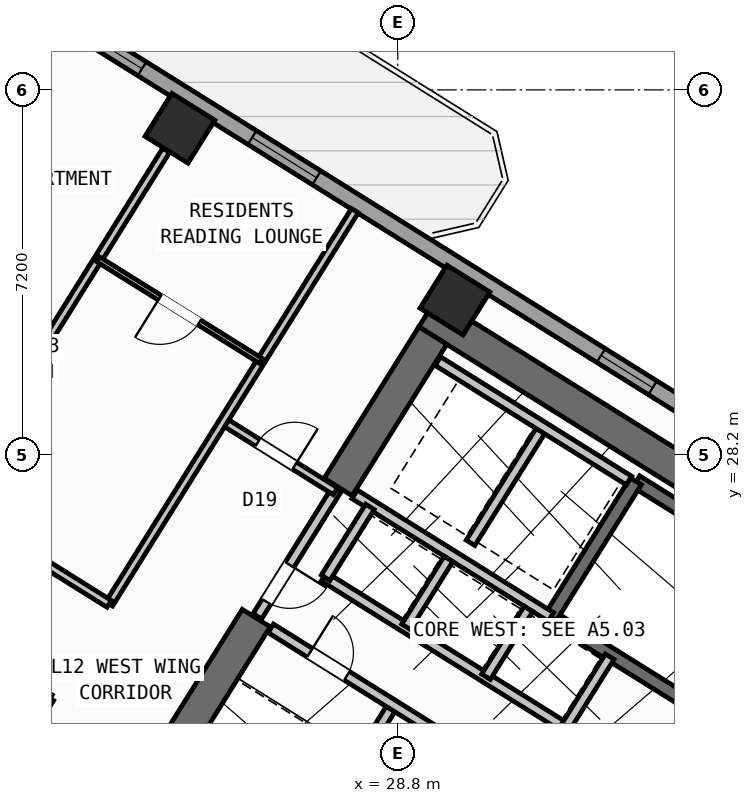
"""IFC4 building model, lengths in metres.
Left out: names, types, materials, properties, quantities, classifications, styles, units other than length and angle.
Written with IfcOpenShell. Run it as: python <this file> out.ifc"""

import sys

from ifc_helpers import new_model, si_unit, direction, frame, frame_2d, origin, origin_2d, place, context, subcontext, project, spatial, rectangle, hollow_rectangle, extrude, source, transform, mapped, element, fill, save


model = new_model("IFC4")
c1 = context("Model", 3, precision=1e-05, world=origin(), true_north=direction((0.0, 1.0)))
c2 = subcontext(c1, "Body", "Model", "MODEL_VIEW")
j1 = project(units=[si_unit("LENGTHUNIT", "METRE"), si_unit("PLANEANGLEUNIT", "RADIAN")], contexts=[c1])
p1 = place(None, origin())
s1 = spatial("IfcSite", under=j1, at=p1, CompositionType="ELEMENT")
p2 = place(p1, origin())
s2 = spatial("IfcBuilding", under=s1, at=p2, CompositionType="ELEMENT")
p3 = place(p2, frame((0.0, 0.0, 49.2)))
s3 = spatial("IfcBuildingStorey", under=s2, at=p3, CompositionType="ELEMENT", Elevation=49.2)
p4 = place(p3, frame((40.615, 23.983, 0.0), z_axis=(0.0, 0.0, 1.0), x_axis=(-0.848045953968, 0.529922692436, 0.0)))
e1 = element("IfcWall", 1, at=p4, inside=s3, PredefinedType="SHEAR", context=c2, shape_type="SweptSolid", body=[
    extrude(rectangle(XDim=13.24, YDim=0.65, at=frame_2d((6.62, 0.0))), origin(), (0.0, 0.0, 1.0), 3.35),
])
p5 = place(p3, frame((29.491, 30.552, 0.0), z_axis=(0.0, 0.0, 1.0), x_axis=(-0.529893103397, -0.8480644427, 0.0)))
e2 = element("IfcWall", 2, at=p5, inside=s3, PredefinedType="SHEAR", context=c2, shape_type="SweptSolid", body=[
    extrude(rectangle(XDim=3.525, YDim=0.65, at=frame_2d((1.763, 0.0))), origin(), (0.0, 0.0, 1.0), 3.35),
])
p6 = place(p3, frame((26.007, 24.976, 0.0), z_axis=(0.0, 0.0, 1.0), x_axis=(-0.529916319127, -0.848049936456, 0.0)))
e3 = element("IfcWall", 3, at=p6, inside=s3, PredefinedType="SHEAR", context=c2, shape_type="SweptSolid", body=[
    extrude(rectangle(XDim=6.375, YDim=0.65, at=frame_2d((3.188, 0.0))), origin(), (0.0, 0.0, 1.0), 3.35),
])
m1 = source(origin(), c2, "Body", "SweptSolid", [
    extrude(hollow_rectangle(XDim=1.0, YDim=1.0, WallThickness=0.04, at=origin_2d()), origin(), (0.0, 0.0, 1.0), 3.6),
])
for number, where, z_axis, x_axis in (
    (4, (29.928, 31.251, 0.0), (0.0, 0.0, 1.0), (-0.848, 0.53, 0.0)),
    (5, (24.5, 34.643, 0.0), (0.0, 0.0, 1.0), (-0.848, 0.53, 0.0)),
):
    element("IfcColumn", number, at=place(p3, frame(where, z_axis=z_axis, x_axis=x_axis)), inside=s3, PredefinedType="COLUMN", context=c2, shape_type="MappedRepresentation", body=[
        mapped(m1, transform((0.0, 0.0, 0.0), scale=1.0)),
    ])
p7 = place(p3, frame((29.268, 6.429, 0.0), z_axis=(0.0, 0.0, 1.0), x_axis=(-0.848049971435, 0.529916263149, 0.0)))
e6 = element("IfcWall", 6, at=p7, inside=s3, PredefinedType="STANDARD", context=c2, shape_type="SweptSolid", body=[
    extrude(rectangle(XDim=31.588, YDim=0.32, at=frame_2d((15.794, 0.0))), origin(), (0.0, 0.0, 1.0), 3.35),
])
p8 = place(p7, frame((16.362, 0.0, 0.0)))
e7 = element("IfcOpeningElement", 7, at=p8, cuts=e6, PredefinedType="OPENING", context=c2, shape_type="SweptSolid", body=[
    extrude(rectangle(XDim=1.2, YDim=2.15, at=frame_2d((0.6, 1.075))), frame((0.0, 0.17, 0.0), z_axis=(0.0, -1.0, 0.0), x_axis=(1.0, 0.0, 0.0)), (0.0, 0.0, 1.0), 0.34),
])
p9 = place(p7, frame((2.989, 0.0, 0.8)))
e8 = element("IfcOpeningElement", 8, at=p9, cuts=e6, PredefinedType="OPENING", context=c2, shape_type="SweptSolid", body=[
    extrude(rectangle(XDim=2.1, YDim=1.55, at=frame_2d((1.05, 0.775))), frame((0.0, 0.17, 0.0), z_axis=(0.0, -1.0, 0.0), x_axis=(1.0, 0.0, 0.0)), (0.0, 0.0, 1.0), 0.34),
])
p10 = place(p7, frame((8.359, 0.0, 0.8)))
e9 = element("IfcOpeningElement", 9, at=p10, cuts=e6, PredefinedType="OPENING", context=c2, shape_type="SweptSolid", body=[
    extrude(rectangle(XDim=2.1, YDim=1.55, at=frame_2d((1.05, 0.775))), frame((0.0, 0.17, 0.0), z_axis=(0.0, -1.0, 0.0), x_axis=(1.0, 0.0, 0.0)), (0.0, 0.0, 1.0), 0.34),
])
p11 = place(p7, frame((13.284, 0.0, 0.95)))
e10 = element("IfcOpeningElement", 10, at=p11, cuts=e6, PredefinedType="OPENING", context=c2, shape_type="SweptSolid", body=[
    extrude(rectangle(XDim=1.2, YDim=1.4, at=frame_2d((0.6, 0.7))), frame((0.0, 0.17, 0.0), z_axis=(0.0, -1.0, 0.0), x_axis=(1.0, 0.0, 0.0)), (0.0, 0.0, 1.0), 0.34),
])
p12 = place(p7, frame((20.259, 0.0, 0.95)))
e11 = element("IfcOpeningElement", 11, at=p12, cuts=e6, PredefinedType="OPENING", context=c2, shape_type="SweptSolid", body=[
    extrude(rectangle(XDim=1.2, YDim=1.4, at=frame_2d((0.6, 0.7))), frame((0.0, 0.17, 0.0), z_axis=(0.0, -1.0, 0.0), x_axis=(1.0, 0.0, 0.0)), (0.0, 0.0, 1.0), 0.34),
])
p13 = place(p7, frame((22.929, 0.0, 0.95)))
e12 = element("IfcOpeningElement", 12, at=p13, cuts=e6, PredefinedType="OPENING", context=c2, shape_type="SweptSolid", body=[
    extrude(rectangle(XDim=1.2, YDim=1.4, at=frame_2d((0.6, 0.7))), frame((0.0, 0.17, 0.0), z_axis=(0.0, -1.0, 0.0), x_axis=(1.0, 0.0, 0.0)), (0.0, 0.0, 1.0), 0.34),
])
p14 = place(p7, frame((26.106, 0.0, 0.85)))
e13 = element("IfcOpeningElement", 13, at=p14, cuts=e6, PredefinedType="OPENING", context=c2, shape_type="SweptSolid", body=[
    extrude(rectangle(XDim=1.5, YDim=1.5, at=frame_2d((0.75, 0.75))), frame((0.0, 0.17, 0.0), z_axis=(0.0, -1.0, 0.0), x_axis=(1.0, 0.0, 0.0)), (0.0, 0.0, 1.0), 0.34),
])
p15 = place(p7, frame((29.068, 0.0, 0.85)))
e14 = element("IfcOpeningElement", 14, at=p15, cuts=e6, PredefinedType="OPENING", context=c2, shape_type="SweptSolid", body=[
    extrude(rectangle(XDim=1.8, YDim=1.5, at=frame_2d((0.9, 0.75))), frame((0.0, 0.17, 0.0), z_axis=(0.0, -1.0, 0.0), x_axis=(1.0, 0.0, 0.0)), (0.0, 0.0, 1.0), 0.34),
])
p16 = place(p3, frame((14.138, 41.825, 0.0), z_axis=(0.0, 0.0, 1.0), x_axis=(0.848046498049, -0.529921821731, 0.0)))
e15 = element("IfcWall", 15, at=p16, inside=s3, PredefinedType="STANDARD", context=c2, shape_type="SweptSolid", body=[
    extrude(rectangle(XDim=31.588, YDim=0.32, at=frame_2d((15.794, 0.0))), origin(), (0.0, 0.0, 1.0), 3.35),
])
p17 = place(p16, frame((3.159, 0.0, 0.0)))
e16 = element("IfcOpeningElement", 16, at=p17, cuts=e15, PredefinedType="OPENING", context=c2, shape_type="SweptSolid", body=[
    extrude(rectangle(XDim=1.05, YDim=2.15, at=frame_2d((0.525, 1.075))), frame((0.0, 0.17, 0.0), z_axis=(0.0, -1.0, 0.0), x_axis=(1.0, 0.0, 0.0)), (0.0, 0.0, 1.0), 0.34),
])
p18 = place(p16, frame((0.906, 0.0, 1.0)))
e17 = element("IfcOpeningElement", 17, at=p18, cuts=e15, PredefinedType="OPENING", context=c2, shape_type="SweptSolid", body=[
    extrude(rectangle(XDim=0.9, YDim=1.25, at=frame_2d((0.45, 0.625))), frame((0.0, 0.17, 0.0), z_axis=(0.0, -1.0, 0.0), x_axis=(1.0, 0.0, 0.0)), (0.0, 0.0, 1.0), 0.34),
])
p19 = place(p16, frame((9.537, 0.0, 0.85)))
e18 = element("IfcOpeningElement", 18, at=p19, cuts=e15, PredefinedType="OPENING", context=c2, shape_type="SweptSolid", body=[
    extrude(rectangle(XDim=1.8, YDim=1.5, at=frame_2d((0.9, 0.75))), frame((0.0, 0.17, 0.0), z_axis=(0.0, -1.0, 0.0), x_axis=(1.0, 0.0, 0.0)), (0.0, 0.0, 1.0), 0.34),
])
p20 = place(p16, frame((13.899, 0.0, 0.85)))
e19 = element("IfcOpeningElement", 19, at=p20, cuts=e15, PredefinedType="OPENING", context=c2, shape_type="SweptSolid", body=[
    extrude(rectangle(XDim=1.5, YDim=1.5, at=frame_2d((0.75, 0.75))), frame((0.0, 0.17, 0.0), z_axis=(0.0, -1.0, 0.0), x_axis=(1.0, 0.0, 0.0)), (0.0, 0.0, 1.0), 0.34),
])
p21 = place(p16, frame((22.019, 0.0, 0.95)))
e20 = element("IfcOpeningElement", 20, at=p21, cuts=e15, PredefinedType="OPENING", context=c2, shape_type="SweptSolid", body=[
    extrude(rectangle(XDim=1.2, YDim=1.4, at=frame_2d((0.6, 0.7))), frame((0.0, 0.17, 0.0), z_axis=(0.0, -1.0, 0.0), x_axis=(1.0, 0.0, 0.0)), (0.0, 0.0, 1.0), 0.34),
])
p22 = place(p16, frame((27.569, 0.0, 0.95)))
e21 = element("IfcOpeningElement", 21, at=p22, cuts=e15, PredefinedType="OPENING", context=c2, shape_type="SweptSolid", body=[
    extrude(rectangle(XDim=1.2, YDim=1.4, at=frame_2d((0.6, 0.7))), frame((0.0, 0.17, 0.0), z_axis=(0.0, -1.0, 0.0), x_axis=(1.0, 0.0, 0.0)), (0.0, 0.0, 1.0), 0.34),
])
p23 = place(p3, frame((39.721, 23.788, 0.0), z_axis=(0.0, 0.0, 1.0), x_axis=(-0.848054434086, 0.529909121291, 0.0)))
e22 = element("IfcWall", 22, at=p23, inside=s3, PredefinedType="SHEAR", context=c2, shape_type="SweptSolid", body=[
    extrude(rectangle(XDim=7.33, YDim=0.26, at=frame_2d((3.665, 0.0))), origin(), (0.0, 0.0, 1.0), 3.35),
])
p24 = place(p3, frame((38.046, 21.108, 0.0), z_axis=(0.0, 0.0, 1.0), x_axis=(-0.848054434086, 0.529909121291, 0.0)))
e23 = element("IfcWall", 23, at=p24, inside=s3, PredefinedType="SHEAR", context=c2, shape_type="SweptSolid", body=[
    extrude(rectangle(XDim=7.33, YDim=0.26, at=frame_2d((3.665, 0.0))), origin(), (0.0, 0.0, 1.0), 3.35),
])
p25 = place(p24, frame((0.22, 0.0, 0.0)))
e24 = element("IfcOpeningElement", 24, at=p25, cuts=e23, PredefinedType="OPENING", context=c2, shape_type="SweptSolid", body=[
    extrude(rectangle(XDim=1.1, YDim=2.1, at=frame_2d((0.55, 1.05))), frame((0.0, 0.14, 0.0), z_axis=(0.0, -1.0, 0.0), x_axis=(1.0, 0.0, 0.0)), (0.0, 0.0, 1.0), 0.28),
])
p26 = place(p3, frame((33.496, 27.677, 0.0), z_axis=(0.0, 0.0, 1.0), x_axis=(-0.529908658664, -0.84805472316, 0.0)))
e25 = element("IfcWall", 25, at=p26, inside=s3, PredefinedType="SHEAR", context=c2, shape_type="SweptSolid", body=[
    extrude(rectangle(XDim=3.16, YDim=0.26, at=frame_2d((1.58, 0.0))), origin(), (0.0, 0.0, 1.0), 3.35),
])
p27 = place(p3, frame((31.822, 24.998, 0.0), z_axis=(0.0, 0.0, 1.0), x_axis=(-0.848058348634, 0.529902856485, 0.0)))
e26 = element("IfcWall", 26, at=p27, inside=s3, PredefinedType="STANDARD", context=c2, shape_type="SweptSolid", body=[
    extrude(rectangle(XDim=4.568, YDim=0.2, at=frame_2d((2.284, 0.0))), origin(), (0.0, 0.0, 1.0), 3.34),
])
p28 = place(p3, frame((32.108, 22.814, 0.0), z_axis=(0.0, 0.0, 1.0), x_axis=(-0.848042229521, 0.529928652696, 0.0)))
e27 = element("IfcWall", 27, at=p28, inside=s3, PredefinedType="STANDARD", context=c2, shape_type="SweptSolid", body=[
    extrude(rectangle(XDim=5.62, YDim=0.2, at=frame_2d((2.81, 0.0))), origin(), (0.0, 0.0, 1.0), 3.34),
])
p29 = place(p3, frame((32.982, 24.213, 0.0), z_axis=(0.0, 0.0, 1.0), x_axis=(-0.529839334948, -0.84809803628, 0.0)))
e28 = element("IfcWall", 28, at=p29, inside=s3, PredefinedType="STANDARD", context=c2, shape_type="SweptSolid", body=[
    extrude(rectangle(XDim=1.65, YDim=0.2, at=frame_2d((0.825, 0.0))), origin(), (0.0, 0.0, 1.0), 3.34),
])
p30 = place(p3, frame((28.25, 27.17, 0.0), z_axis=(0.0, 0.0, 1.0), x_axis=(-0.529905827651, -0.848056492117, 0.0)))
e29 = element("IfcWall", 29, at=p30, inside=s3, PredefinedType="STANDARD", context=c2, shape_type="SweptSolid", body=[
    extrude(rectangle(XDim=1.65, YDim=0.2, at=frame_2d((0.825, 0.0))), origin(), (0.0, 0.0, 1.0), 3.34),
])
p31 = place(p3, frame((31.645, 28.716, 0.0), z_axis=(0.0, 0.0, 1.0), x_axis=(-0.52986693015, -0.848080795876, 0.0)))
e30 = element("IfcWall", 30, at=p31, inside=s3, PredefinedType="STANDARD", context=c2, shape_type="SweptSolid", body=[
    extrude(rectangle(XDim=2.66, YDim=0.2, at=frame_2d((1.33, 0.0))), origin(), (0.0, 0.0, 1.0), 3.34),
])
p32 = place(p3, frame((33.363, 27.69, 0.0), z_axis=(0.0, 0.0, 1.0), x_axis=(-0.848053806312, 0.529910125964, 0.0)))
e31 = element("IfcWall", 31, at=p32, inside=s3, PredefinedType="STANDARD", context=c2, shape_type="SweptSolid", body=[
    extrude(rectangle(XDim=4.448, YDim=0.2, at=frame_2d((2.224, 0.0))), origin(), (0.0, 0.0, 1.0), 3.34),
])
for number, where, z_axis, x_axis in (
    (32, (31.379, 25.156, 0.0), (0.0, 0.0, 1.0), (-0.53, -0.848, 0.0)),
    (33, (29.801, 26.142, 0.0), (0.0, 0.0, 1.0), (-0.53, -0.848, 0.0)),
):
    element("IfcWall", number, at=place(p3, frame(where, z_axis=z_axis, x_axis=x_axis)), inside=s3, PredefinedType="STANDARD", context=c2, shape_type="SweptSolid", body=[
        extrude(rectangle(XDim=1.58, YDim=0.2, at=frame_2d((0.79, 0.0))), origin(), (0.0, 0.0, 1.0), 3.34),
    ])
p33 = place(p3, frame((28.71, 23.263, 0.0), z_axis=(0.0, 0.0, 1.0), x_axis=(-0.529907497854, -0.848055448493, 0.0)))
e34 = element("IfcWall", 34, at=p33, inside=s3, PredefinedType="STANDARD", context=c2, shape_type="SweptSolid", body=[
    extrude(rectangle(XDim=2.88, YDim=0.2, at=frame_2d((1.44, 0.0))), origin(), (0.0, 0.0, 1.0), 3.34),
])
p34 = place(p3, frame((31.525, 21.504, 0.0), z_axis=(0.0, 0.0, 1.0), x_axis=(-0.848044998614, 0.529924221305, 0.0)))
e35 = element("IfcWall", 35, at=p34, inside=s3, PredefinedType="STANDARD", context=c2, shape_type="SweptSolid", body=[
    extrude(rectangle(XDim=6.168, YDim=0.2, at=frame_2d((3.084, 0.0))), origin(), (0.0, 0.0, 1.0), 3.34),
])
p35 = place(p34, frame((4.4, 0.0, 0.0)))
e36 = element("IfcOpeningElement", 36, at=p35, cuts=e35, PredefinedType="OPENING", context=c2, shape_type="SweptSolid", body=[
    extrude(rectangle(XDim=0.86, YDim=2.05, at=frame_2d((0.43, 1.025))), frame((0.0, 0.11, 0.0), z_axis=(0.0, -1.0, 0.0), x_axis=(1.0, 0.0, 0.0)), (0.0, 0.0, 1.0), 0.22),
])
p36 = place(p34, frame((0.35, 0.0, 0.0)))
e37 = element("IfcOpeningElement", 37, at=p36, cuts=e35, PredefinedType="OPENING", context=c2, shape_type="SweptSolid", body=[
    extrude(rectangle(XDim=0.86, YDim=2.05, at=frame_2d((0.43, 1.025))), frame((0.0, 0.11, 0.0), z_axis=(0.0, -1.0, 0.0), x_axis=(1.0, 0.0, 0.0)), (0.0, 0.0, 1.0), 0.22),
])
p37 = place(p3, frame((27.596, 27.52, 0.0), z_axis=(0.0, 0.0, 1.0), x_axis=(-0.529865479138, -0.848081702443, 0.0)))
e38 = element("IfcWall", 38, at=p37, inside=s3, PredefinedType="STANDARD", context=c2, shape_type="SweptSolid", body=[
    extrude(rectangle(XDim=2.96, YDim=0.2, at=frame_2d((1.48, 0.0))), origin(), (0.0, 0.0, 1.0), 3.34),
])
p38 = place(p37, frame((1.76, 0.0, 0.0)))
e39 = element("IfcOpeningElement", 39, at=p38, cuts=e38, PredefinedType="OPENING", context=c2, shape_type="SweptSolid", body=[
    extrude(rectangle(XDim=0.86, YDim=2.05, at=frame_2d((0.43, 1.025))), frame((0.0, 0.11, 0.0), z_axis=(0.0, -1.0, 0.0), x_axis=(1.0, 0.0, 0.0)), (0.0, 0.0, 1.0), 0.22),
])
p39 = place(p3, frame((27.57, 27.478, 0.0), z_axis=(0.0, 0.0, 1.0), x_axis=(-0.848050851465, 0.529914854792, 0.0)))
e40 = element("IfcWall", 40, at=p39, inside=s3, PredefinedType="PARTITIONING", context=c2, shape_type="SweptSolid", body=[
    extrude(rectangle(XDim=2.61, YDim=0.16, at=frame_2d((1.305, 0.0))), origin(), (0.0, 0.0, 1.0), 3.34),
])
p40 = place(p39, frame((0.95, 0.0, 0.0)))
e41 = element("IfcOpeningElement", 41, at=p40, cuts=e40, PredefinedType="OPENING", context=c2, shape_type="SweptSolid", body=[
    extrude(rectangle(XDim=0.86, YDim=2.05, at=frame_2d((0.43, 1.025))), frame((0.0, 0.09, 0.0), z_axis=(0.0, -1.0, 0.0), x_axis=(1.0, 0.0, 0.0)), (0.0, 0.0, 1.0), 0.18),
])
p41 = place(p3, frame((27.953, 33.016, 0.0), z_axis=(0.0, 0.0, 1.0), x_axis=(-0.529903001606, -0.848058257957, 0.0)))
e42 = element("IfcWall", 42, at=p41, inside=s3, PredefinedType="PARTITIONING", context=c2, shape_type="SweptSolid", body=[
    extrude(rectangle(XDim=9.15, YDim=0.16, at=frame_2d((4.575, 0.0))), origin(), (0.0, 0.0, 1.0), 3.34),
])
p42 = place(p3, frame((21.938, 23.391, 0.0), z_axis=(0.0, 0.0, 1.0), x_axis=(-0.529924725692, -0.848044683434, 0.0)))
e43 = element("IfcWall", 43, at=p42, inside=s3, PredefinedType="PARTITIONING", context=c2, shape_type="SweptSolid", body=[
    extrude(rectangle(XDim=10.35, YDim=0.16, at=frame_2d((5.175, 0.0))), origin(), (0.0, 0.0, 1.0), 3.34),
])
p43 = place(p3, frame((23.104, 25.256, 0.0), z_axis=(0.0, 0.0, 1.0), x_axis=(-0.848041752158, 0.529929416617, 0.0)))
e44 = element("IfcWall", 44, at=p43, inside=s3, PredefinedType="PARTITIONING", context=c2, shape_type="SweptSolid", body=[
    extrude(rectangle(XDim=16.73, YDim=0.16, at=frame_2d((8.365, 0.0))), origin(), (0.0, 0.0, 1.0), 3.34),
])
p44 = place(p43, frame((1.395, 0.0, 0.0)))
e45 = element("IfcOpeningElement", 45, at=p44, cuts=e44, PredefinedType="OPENING", context=c2, shape_type="SweptSolid", body=[
    extrude(rectangle(XDim=1.0, YDim=2.1, at=frame_2d((0.5, 1.05))), frame((0.0, 0.09, 0.0), z_axis=(0.0, -1.0, 0.0), x_axis=(1.0, 0.0, 0.0)), (0.0, 0.0, 1.0), 0.18),
])
p45 = place(p43, frame((7.82, 0.0, 0.0)))
e46 = element("IfcOpeningElement", 46, at=p45, cuts=e44, PredefinedType="OPENING", context=c2, shape_type="SweptSolid", body=[
    extrude(rectangle(XDim=1.0, YDim=2.1, at=frame_2d((0.5, 1.05))), frame((0.0, 0.09, 0.0), z_axis=(0.0, -1.0, 0.0), x_axis=(1.0, 0.0, 0.0)), (0.0, 0.0, 1.0), 0.18),
])
p46 = place(p43, frame((14.76, 0.0, 0.0)))
e47 = element("IfcOpeningElement", 47, at=p46, cuts=e44, PredefinedType="OPENING", context=c2, shape_type="SweptSolid", body=[
    extrude(rectangle(XDim=1.0, YDim=2.1, at=frame_2d((0.5, 1.05))), frame((0.0, 0.09, 0.0), z_axis=(0.0, -1.0, 0.0), x_axis=(1.0, 0.0, 0.0)), (0.0, 0.0, 1.0), 0.18),
])
p47 = place(p3, frame((24.229, 34.209, 0.0), z_axis=(0.0, 0.0, 1.0), x_axis=(-0.529897533635, -0.848061674554, 0.0)))
e48 = element("IfcWall", 48, at=p47, inside=s3, PredefinedType="PARTITIONING", context=c2, shape_type="SweptSolid", body=[
    extrude(rectangle(XDim=6.276, YDim=0.16, at=frame_2d((3.138, 0.0))), origin(), (0.0, 0.0, 1.0), 2.725),
])
p48 = place(p3, frame((26.099, 30.05, 0.0), z_axis=(0.0, 0.0, 1.0), x_axis=(-0.84803087207, 0.529946827537, 0.0)))
e49 = element("IfcWall", 49, at=p48, inside=s3, PredefinedType="PARTITIONING", context=c2, shape_type="SweptSolid", body=[
    extrude(rectangle(XDim=3.79, YDim=0.11, at=frame_2d((1.895, 0.0))), origin(), (0.0, 0.0, 1.0), 3.34),
])
p49 = place(p48, frame((1.435, 0.0, 0.0)))
e50 = element("IfcOpeningElement", 50, at=p49, cuts=e49, PredefinedType="OPENING", context=c2, shape_type="SweptSolid", body=[
    extrude(rectangle(XDim=0.92, YDim=2.08, at=frame_2d((0.46, 1.04))), frame((0.0, 0.065, 0.0), z_axis=(0.0, -1.0, 0.0), x_axis=(1.0, 0.0, 0.0)), (0.0, 0.0, 1.0), 0.13),
])
m2 = source(origin(), c2, "Body", "SweptSolid", [
    extrude(rectangle(XDim=1.8, YDim=1.5, at=frame_2d((0.9, 0.75))), frame((0.0, 0.03, 0.0), z_axis=(0.0, -1.0, 0.0), x_axis=(1.0, 0.0, 0.0)), (0.0, 0.0, 1.0), 0.06),
])
p50 = place(p19, origin())
e51 = element("IfcWindow", 51, at=p50, inside=s3, PartitioningType="SINGLE_PANEL", PredefinedType="WINDOW", context=c2, shape_type="MappedRepresentation", body=[
    mapped(m2, transform((0.0, 0.0, 0.0), scale=1.0)),
])
fill(e18, e51)
m3 = source(origin(), c2, "Body", "SweptSolid", [
    extrude(rectangle(XDim=1.5, YDim=1.5, at=frame_2d((0.75, 0.75))), frame((0.0, 0.03, 0.0), z_axis=(0.0, -1.0, 0.0), x_axis=(1.0, 0.0, 0.0)), (0.0, 0.0, 1.0), 0.06),
])
p51 = place(p20, origin())
e52 = element("IfcWindow", 52, at=p51, inside=s3, PartitioningType="SINGLE_PANEL", PredefinedType="WINDOW", context=c2, shape_type="MappedRepresentation", body=[
    mapped(m3, transform((0.0, 0.0, 0.0), scale=1.0)),
])
fill(e19, e52)
m4 = source(origin(), c2, "Body", "SweptSolid", [
    extrude(rectangle(XDim=1.2, YDim=1.4, at=frame_2d((0.6, 0.7))), frame((0.0, 0.03, 0.0), z_axis=(0.0, -1.0, 0.0), x_axis=(1.0, 0.0, 0.0)), (0.0, 0.0, 1.0), 0.06),
])
p52 = place(p21, origin())
e53 = element("IfcWindow", 53, at=p52, inside=s3, PartitioningType="SINGLE_PANEL", PredefinedType="WINDOW", context=c2, shape_type="MappedRepresentation", body=[
    mapped(m4, transform((0.0, 0.0, 0.0), scale=1.0)),
])
fill(e20, e53)
m5 = source(origin(), c2, "Body", "SweptSolid", [
    extrude(rectangle(XDim=0.86, YDim=2.05, at=frame_2d((0.43, 1.025))), frame((0.0, 0.025, 0.0), z_axis=(0.0, -1.0, 0.0), x_axis=(1.0, 0.0, 0.0)), (0.0, 0.0, 1.0), 0.05),
])
p53 = place(p35, frame((0.86, 0.0, 0.0), z_axis=(0.0, 0.0, 1.0), x_axis=(-1.0, 0.0, 0.0)))
e54 = element("IfcDoor", 54, at=p53, inside=s3, OperationType="SINGLE_SWING_LEFT", PredefinedType="DOOR", context=c2, shape_type="MappedRepresentation", body=[
    mapped(m5, transform((0.0, 0.0, 0.0), scale=1.0)),
])
fill(e36, e54)
p54 = place(p40, frame((0.86, 0.0, 0.0), z_axis=(0.0, 0.0, 1.0), x_axis=(-1.0, 0.0, 0.0)))
e55 = element("IfcDoor", 55, at=p54, inside=s3, OperationType="SINGLE_SWING_RIGHT", PredefinedType="DOOR", context=c2, shape_type="MappedRepresentation", body=[
    mapped(m5, transform((0.0, 0.0, 0.0), scale=1.0)),
])
fill(e41, e55)
p55 = place(p38, origin())
e56 = element("IfcDoor", 56, at=p55, inside=s3, OperationType="SINGLE_SWING_LEFT", PredefinedType="DOOR", context=c2, shape_type="MappedRepresentation", body=[
    mapped(m5, transform((0.0, 0.0, 0.0), scale=1.0)),
])
fill(e39, e56)
m6 = source(origin(), c2, "Body", "SweptSolid", [
    extrude(rectangle(XDim=0.92, YDim=2.08, at=frame_2d((0.46, 1.04))), frame((0.0, 0.025, 0.0), z_axis=(0.0, -1.0, 0.0), x_axis=(1.0, 0.0, 0.0)), (0.0, 0.0, 1.0), 0.05),
])
p56 = place(p49, origin())
e57 = element("IfcDoor", 57, at=p56, inside=s3, OperationType="SINGLE_SWING_RIGHT", PredefinedType="DOOR", context=c2, shape_type="MappedRepresentation", body=[
    mapped(m6, transform((0.0, 0.0, 0.0), scale=1.0)),
])
fill(e50, e57)
save(model, sys.argv[1])
